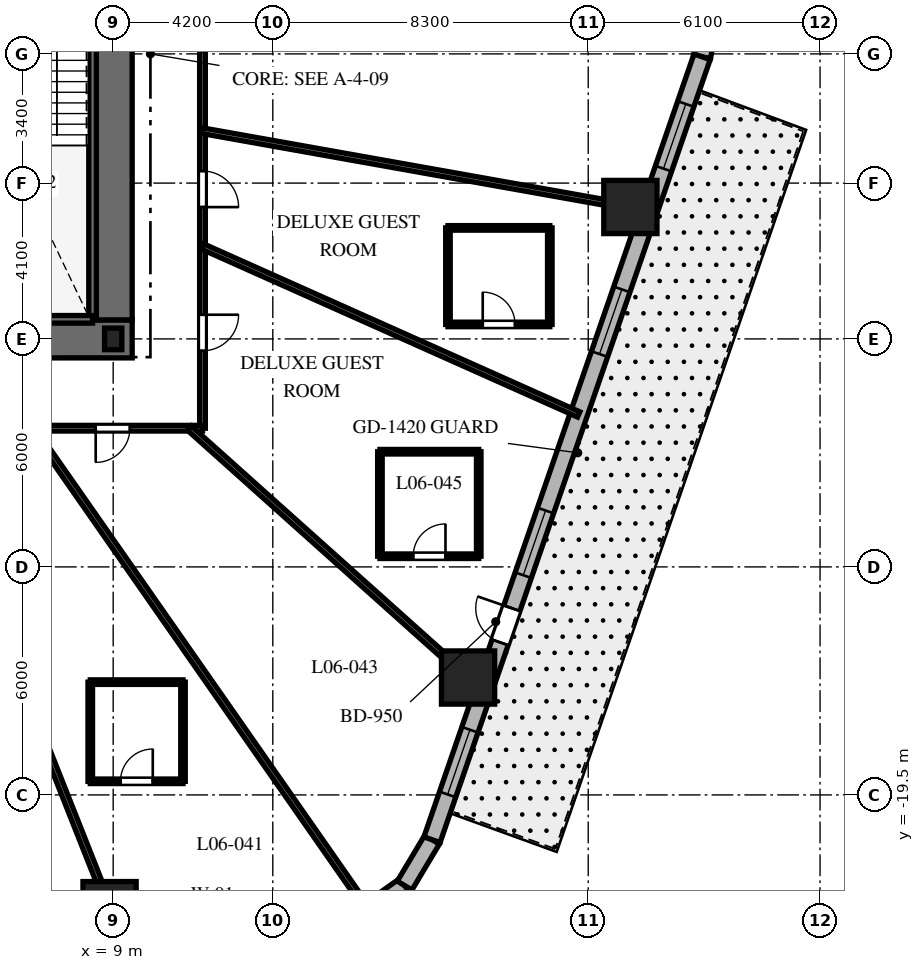
"""IFC4 building model, lengths in metres.
Left out: names, types, materials, properties, quantities, classifications, styles, units other than length and angle.
Written with IfcOpenShell. Run it as: python <this file> out.ifc"""

import sys

from ifc_helpers import new_model, si_unit, direction, frame, frame_2d, origin, origin_2d, place, context, subcontext, project, spatial, rectangle, i_section, extrude, element, fill, save


model = new_model("IFC4")
c1 = context("Model", 3, precision=1e-05, world=origin(), true_north=direction((0.0, 1.0)))
c2 = subcontext(c1, "Body", "Model", "MODEL_VIEW")
j1 = project(units=[si_unit("LENGTHUNIT", "METRE"), si_unit("PLANEANGLEUNIT", "RADIAN")], contexts=[c1])
p1 = place(None, origin())
s1 = spatial("IfcSite", under=j1, at=p1, CompositionType="ELEMENT")
p2 = place(p1, origin())
s2 = spatial("IfcBuilding", under=s1, at=p2, CompositionType="ELEMENT")
p3 = place(p2, frame((0.0, 0.0, 34.2)))
s3 = spatial("IfcBuildingStorey", under=s2, at=p3, CompositionType="ELEMENT", Elevation=34.2)
p4 = place(p3, frame((-9.5, -7.5, 0.0), z_axis=(0.0, 0.0, 1.0), x_axis=(1.0, 0.0, 0.0)))
e1 = element("IfcWall", 1, at=p4, inside=s3, PredefinedType="SHEAR", context=c2, shape_type="SweptSolid", body=[
    extrude(rectangle(XDim=19.0, YDim=1.0, at=frame_2d((9.5, 0.0))), origin(), (0.0, 0.0, 1.0), 3.7),
])
p5 = place(p4, frame((9.55, 0.0, 0.0)))
e2 = element("IfcOpeningElement", 2, at=p5, cuts=e1, PredefinedType="OPENING", context=c2, shape_type="SweptSolid", body=[
    extrude(rectangle(XDim=1.0, YDim=2.15, at=frame_2d((0.5, 1.075))), frame((0.0, 0.51, 0.0), z_axis=(0.0, -1.0, 0.0), x_axis=(1.0, 0.0, 0.0)), (0.0, 0.0, 1.0), 1.02),
])
p6 = place(p3, frame((9.0, -7.0, 0.0), z_axis=(0.0, 0.0, 1.0), x_axis=(0.0, 1.0, 0.0)))
e3 = element("IfcWall", 3, at=p6, inside=s3, PredefinedType="SHEAR", context=c2, shape_type="SweptSolid", body=[
    extrude(rectangle(XDim=14.0, YDim=1.0, at=frame_2d((7.0, 0.0))), origin(), (0.0, 0.0, 1.0), 3.7),
])
p7 = place(p6, frame((10.125, 0.0, 0.0)))
e4 = element("IfcOpeningElement", 4, at=p7, cuts=e3, PredefinedType="OPENING", context=c2, shape_type="SweptSolid", body=[
    extrude(rectangle(XDim=1.05, YDim=2.15, at=frame_2d((0.525, 1.075))), frame((0.0, 0.51, 0.0), z_axis=(0.0, -1.0, 0.0), x_axis=(1.0, 0.0, 0.0)), (0.0, 0.0, 1.0), 1.02),
])
p8 = place(p3, frame((8.458, -6.985, 0.0), z_axis=(0.0, 0.0, 1.0), x_axis=(0.0, 1.0, 0.0)))
e5 = element("IfcWall", 5, at=p8, inside=s3, PredefinedType="SHEAR", context=c2, shape_type="SweptSolid", body=[
    extrude(rectangle(XDim=9.143, YDim=0.2, at=frame_2d((4.572, 0.0))), origin(), (0.0, 0.0, 1.0), 3.7),
])
p9 = place(p3, frame((4.772, -6.985, 0.0), z_axis=(0.0, 0.0, 1.0), x_axis=(1.0, 0.0, 0.0)))
e6 = element("IfcWall", 6, at=p9, inside=s3, PredefinedType="SHEAR", context=c2, shape_type="SweptSolid", body=[
    extrude(rectangle(XDim=3.686, YDim=0.2, at=frame_2d((1.843, 0.0))), origin(), (0.0, 0.0, 1.0), 3.7),
])
p10 = place(p3, frame((9.0, -7.5, 0.0), z_axis=(0.0, 0.0, 1.0), x_axis=(1.0, 0.0, 0.0)))
e7 = element("IfcColumn", 7, at=p10, inside=s3, PredefinedType="COLUMN", context=c2, shape_type="SweptSolid", body=[
    extrude(i_section(OverallWidth=0.454, OverallDepth=0.569, WebThickness=0.078, FlangeThickness=0.125, at=origin_2d()), origin(), (0.0, 0.0, 1.0), 3.7),
])
for number, where, z_axis, x_axis in (
    (8, (8.905, -22.48, 0.0), (0.0, 0.0, 1.0), (1.0, 0.0, 0.0)),
    (9, (18.338, -16.411, 0.0), (0.0, 0.0, 1.0), (1.0, 0.0, 0.0)),
    (10, (22.609, -4.029, 0.0), (0.0, 0.0, 1.0), (1.0, 0.0, 0.0)),
):
    element("IfcColumn", number, at=place(p3, frame(where, z_axis=z_axis, x_axis=x_axis)), inside=s3, PredefinedType="COLUMN", context=c2, shape_type="SweptSolid", body=[
        extrude(rectangle(XDim=1.4, YDim=1.4, at=origin_2d()), origin(), (0.0, 0.0, 1.0), 3.7),
    ])
p11 = place(p3, frame((15.544, -22.687, 0.0), z_axis=(0.0, 0.0, 1.0), x_axis=(0.814210854316, 0.580569276412, 0.0)))
e11 = element("IfcWall", 11, at=p11, inside=s3, PredefinedType="SOLIDWALL", context=c2, shape_type="SweptSolid", body=[
    extrude(rectangle(XDim=1.381, YDim=0.45, at=frame_2d((0.691, 0.0))), origin(), (0.0, 0.0, 1.0), 3.4),
])
p12 = place(p3, frame((16.669, -21.885, 0.0), z_axis=(0.0, 0.0, 1.0), x_axis=(0.512936712947, 0.858426425799, 0.0)))
e12 = element("IfcWall", 12, at=p12, inside=s3, PredefinedType="SOLIDWALL", context=c2, shape_type="SweptSolid", body=[
    extrude(rectangle(XDim=1.406, YDim=0.45, at=frame_2d((0.703, 0.0))), origin(), (0.0, 0.0, 1.0), 3.4),
])
p13 = place(p3, frame((24.496, -0.077, 0.0), z_axis=(0.0, 0.0, 1.0), x_axis=(0.199570594521, 0.979883451132, 0.0)))
e13 = element("IfcWall", 13, at=p13, inside=s3, PredefinedType="SOLIDWALL", context=c2, shape_type="SweptSolid", body=[
    extrude(rectangle(XDim=0.897, YDim=0.45, at=frame_2d((0.448, 0.0))), origin(), (0.0, 0.0, 1.0), 3.4),
])
p14 = place(p3, frame((17.39, -20.678, 0.0), z_axis=(0.0, 0.0, 1.0), x_axis=(0.326068018294, 0.945346310854, 0.0)))
e14 = element("IfcWall", 14, at=p14, inside=s3, PredefinedType="SOLIDWALL", context=c2, shape_type="SweptSolid", body=[
    extrude(rectangle(XDim=21.793, YDim=0.45, at=frame_2d((10.896, 0.0))), origin(), (0.0, 0.0, 1.0), 3.4),
])
p15 = place(p14, frame((5.493, 0.0, 0.0)))
e15 = element("IfcOpeningElement", 15, at=p15, cuts=e14, PredefinedType="OPENING", context=c2, shape_type="SweptSolid", body=[
    extrude(rectangle(XDim=0.95, YDim=2.15, at=frame_2d((0.475, 1.075))), frame((0.0, 0.235, 0.0), z_axis=(0.0, -1.0, 0.0), x_axis=(1.0, 0.0, 0.0)), (0.0, 0.0, 1.0), 0.47),
])
p16 = place(p14, frame((1.26, 0.0, 0.8)))
e16 = element("IfcOpeningElement", 16, at=p16, cuts=e14, PredefinedType="OPENING", context=c2, shape_type="SweptSolid", body=[
    extrude(rectangle(XDim=1.8, YDim=1.8, at=frame_2d((0.9, 0.9))), frame((0.0, 0.235, 0.0), z_axis=(0.0, -1.0, 0.0), x_axis=(1.0, 0.0, 0.0)), (0.0, 0.0, 1.0), 0.47),
])
p17 = place(p14, frame((7.363, 0.0, 0.8)))
e17 = element("IfcOpeningElement", 17, at=p17, cuts=e14, PredefinedType="OPENING", context=c2, shape_type="SweptSolid", body=[
    extrude(rectangle(XDim=1.8, YDim=1.8, at=frame_2d((0.9, 0.9))), frame((0.0, 0.235, 0.0), z_axis=(0.0, -1.0, 0.0), x_axis=(1.0, 0.0, 0.0)), (0.0, 0.0, 1.0), 0.47),
])
p18 = place(p14, frame((13.518, 0.0, 0.8)))
e18 = element("IfcOpeningElement", 18, at=p18, cuts=e14, PredefinedType="OPENING", context=c2, shape_type="SweptSolid", body=[
    extrude(rectangle(XDim=1.8, YDim=1.8, at=frame_2d((0.9, 0.9))), frame((0.0, 0.235, 0.0), z_axis=(0.0, -1.0, 0.0), x_axis=(1.0, 0.0, 0.0)), (0.0, 0.0, 1.0), 0.47),
])
p19 = place(p14, frame((18.68, 0.0, 0.8)))
e19 = element("IfcOpeningElement", 19, at=p19, cuts=e14, PredefinedType="OPENING", context=c2, shape_type="SweptSolid", body=[
    extrude(rectangle(XDim=1.8, YDim=1.8, at=frame_2d((0.9, 0.9))), frame((0.0, 0.235, 0.0), z_axis=(0.0, -1.0, 0.0), x_axis=(1.0, 0.0, 0.0)), (0.0, 0.0, 1.0), 0.47),
])
p20 = place(p3, frame((11.35, 9.85, 0.0), z_axis=(0.0, 0.0, 1.0), x_axis=(0.0, -1.0, 0.0)))
e20 = element("IfcWall", 20, at=p20, inside=s3, PredefinedType="PARTITIONING", context=c2, shape_type="SweptSolid", body=[
    extrude(rectangle(XDim=19.7, YDim=0.15, at=frame_2d((9.85, 0.0))), origin(), (0.0, 0.0, 1.0), 2.84),
])
p21 = place(p20, frame((4.461, 0.0, 0.0)))
e21 = element("IfcOpeningElement", 21, at=p21, cuts=e20, PredefinedType="OPENING", context=c2, shape_type="SweptSolid", body=[
    extrude(rectangle(XDim=0.95, YDim=2.03, at=frame_2d((0.475, 1.015))), frame((0.0, 0.085, 0.0), z_axis=(0.0, -1.0, 0.0), x_axis=(1.0, 0.0, 0.0)), (0.0, 0.0, 1.0), 0.17),
])
p22 = place(p20, frame((1.221, 0.0, 0.0)))
e22 = element("IfcOpeningElement", 22, at=p22, cuts=e20, PredefinedType="OPENING", context=c2, shape_type="SweptSolid", body=[
    extrude(rectangle(XDim=0.95, YDim=2.03, at=frame_2d((0.475, 1.015))), frame((0.0, 0.085, 0.0), z_axis=(0.0, -1.0, 0.0), x_axis=(1.0, 0.0, 0.0)), (0.0, 0.0, 1.0), 0.17),
])
p23 = place(p20, frame((16.714, 0.0, 0.0)))
e23 = element("IfcOpeningElement", 23, at=p23, cuts=e20, PredefinedType="OPENING", context=c2, shape_type="SweptSolid", body=[
    extrude(rectangle(XDim=0.95, YDim=2.03, at=frame_2d((0.475, 1.015))), frame((0.0, 0.085, 0.0), z_axis=(0.0, -1.0, 0.0), x_axis=(1.0, 0.0, 0.0)), (0.0, 0.0, 1.0), 0.17),
])
p24 = place(p20, frame((12.932, 0.0, 0.0)))
e24 = element("IfcOpeningElement", 24, at=p24, cuts=e20, PredefinedType="OPENING", context=c2, shape_type="SweptSolid", body=[
    extrude(rectangle(XDim=0.95, YDim=2.03, at=frame_2d((0.475, 1.015))), frame((0.0, 0.085, 0.0), z_axis=(0.0, -1.0, 0.0), x_axis=(1.0, 0.0, 0.0)), (0.0, 0.0, 1.0), 0.17),
])
p25 = place(p20, frame((8.838, 0.0, 0.0)))
e25 = element("IfcOpeningElement", 25, at=p25, cuts=e20, PredefinedType="OPENING", context=c2, shape_type="SweptSolid", body=[
    extrude(rectangle(XDim=0.95, YDim=2.03, at=frame_2d((0.475, 1.015))), frame((0.0, 0.085, 0.0), z_axis=(0.0, -1.0, 0.0), x_axis=(1.0, 0.0, 0.0)), (0.0, 0.0, 1.0), 0.17),
])
p26 = place(p3, frame((11.35, -9.85, 0.0), z_axis=(0.0, 0.0, 1.0), x_axis=(-1.0, 0.0, 0.0)))
e26 = element("IfcWall", 26, at=p26, inside=s3, PredefinedType="PARTITIONING", context=c2, shape_type="SweptSolid", body=[
    extrude(rectangle(XDim=22.7, YDim=0.15, at=frame_2d((11.35, 0.0))), origin(), (0.0, 0.0, 1.0), 2.84),
])
p27 = place(p26, frame((18.436, 0.0, 0.0)))
e27 = element("IfcOpeningElement", 27, at=p27, cuts=e26, PredefinedType="OPENING", context=c2, shape_type="SweptSolid", body=[
    extrude(rectangle(XDim=0.95, YDim=2.03, at=frame_2d((0.475, 1.015))), frame((0.0, 0.085, 0.0), z_axis=(0.0, -1.0, 0.0), x_axis=(1.0, 0.0, 0.0)), (0.0, 0.0, 1.0), 0.17),
])
p28 = place(p26, frame((15.176, 0.0, 0.0)))
e28 = element("IfcOpeningElement", 28, at=p28, cuts=e26, PredefinedType="OPENING", context=c2, shape_type="SweptSolid", body=[
    extrude(rectangle(XDim=0.9, YDim=2.03, at=frame_2d((0.45, 1.015))), frame((0.0, 0.085, 0.0), z_axis=(0.0, -1.0, 0.0), x_axis=(1.0, 0.0, 0.0)), (0.0, 0.0, 1.0), 0.17),
])
p29 = place(p26, frame((12.415, 0.0, 0.0)))
e29 = element("IfcOpeningElement", 29, at=p29, cuts=e26, PredefinedType="OPENING", context=c2, shape_type="SweptSolid", body=[
    extrude(rectangle(XDim=0.95, YDim=2.03, at=frame_2d((0.475, 1.015))), frame((0.0, 0.085, 0.0), z_axis=(0.0, -1.0, 0.0), x_axis=(1.0, 0.0, 0.0)), (0.0, 0.0, 1.0), 0.17),
])
p30 = place(p26, frame((8.925, 0.0, 0.0)))
e30 = element("IfcOpeningElement", 30, at=p30, cuts=e26, PredefinedType="OPENING", context=c2, shape_type="SweptSolid", body=[
    extrude(rectangle(XDim=0.95, YDim=2.03, at=frame_2d((0.475, 1.015))), frame((0.0, 0.085, 0.0), z_axis=(0.0, -1.0, 0.0), x_axis=(1.0, 0.0, 0.0)), (0.0, 0.0, 1.0), 0.17),
])
p31 = place(p26, frame((5.463, 0.0, 0.0)))
e31 = element("IfcOpeningElement", 31, at=p31, cuts=e26, PredefinedType="OPENING", context=c2, shape_type="SweptSolid", body=[
    extrude(rectangle(XDim=0.95, YDim=2.03, at=frame_2d((0.475, 1.015))), frame((0.0, 0.085, 0.0), z_axis=(0.0, -1.0, 0.0), x_axis=(1.0, 0.0, 0.0)), (0.0, 0.0, 1.0), 0.17),
])
p32 = place(p26, frame((1.91, 0.0, 0.0)))
e32 = element("IfcOpeningElement", 32, at=p32, cuts=e26, PredefinedType="OPENING", context=c2, shape_type="SweptSolid", body=[
    extrude(rectangle(XDim=0.9, YDim=2.03, at=frame_2d((0.45, 1.015))), frame((0.0, 0.085, 0.0), z_axis=(0.0, -1.0, 0.0), x_axis=(1.0, 0.0, 0.0)), (0.0, 0.0, 1.0), 0.17),
])
p33 = place(p3, frame((3.902, -9.85, 0.0), z_axis=(0.0, 0.0, 1.0), x_axis=(0.36828765711, -0.929711891728, 0.0)))
e33 = element("IfcWall", 33, at=p33, inside=s3, PredefinedType="PARTITIONING", context=c2, shape_type="SweptSolid", body=[
    extrude(rectangle(XDim=14.117, YDim=0.15, at=frame_2d((7.059, 0.0))), origin(), (0.0, 0.0, 1.0), 2.54),
])
p34 = place(p3, frame((6.869, -9.85, 0.0), z_axis=(0.0, 0.0, 1.0), x_axis=(0.572039834497, -0.820225839479, 0.0)))
e34 = element("IfcWall", 34, at=p34, inside=s3, PredefinedType="PARTITIONING", context=c2, shape_type="SweptSolid", body=[
    extrude(rectangle(XDim=15.329, YDim=0.15, at=frame_2d((7.665, 0.0))), origin(), (0.0, 0.0, 1.0), 2.54),
])
p35 = place(p3, frame((11.007, -9.85, 0.0), z_axis=(0.0, 0.0, 1.0), x_axis=(0.745177305978, -0.666866390407, 0.0)))
e35 = element("IfcWall", 35, at=p35, inside=s3, PredefinedType="PARTITIONING", context=c2, shape_type="SweptSolid", body=[
    extrude(rectangle(XDim=10.375, YDim=0.15, at=frame_2d((5.188, 0.0))), origin(), (0.0, 0.0, 1.0), 2.54),
])
p36 = place(p3, frame((11.35, -5.068, 0.0), z_axis=(0.0, 0.0, 1.0), x_axis=(0.913107192911, -0.407719577963, 0.0)))
e36 = element("IfcWall", 36, at=p36, inside=s3, PredefinedType="PARTITIONING", context=c2, shape_type="SweptSolid", body=[
    extrude(rectangle(XDim=10.841, YDim=0.15, at=frame_2d((5.421, 0.0))), origin(), (0.0, 0.0, 1.0), 2.54),
])
p37 = place(p3, frame((11.35, -2.023, 0.0), z_axis=(0.0, 0.0, 1.0), x_axis=(0.984493741877, -0.17541970301, 0.0)))
e37 = element("IfcWall", 37, at=p37, inside=s3, PredefinedType="PARTITIONING", context=c2, shape_type="SweptSolid", body=[
    extrude(rectangle(XDim=11.937, YDim=0.15, at=frame_2d((5.969, 0.0))), origin(), (0.0, 0.0, 1.0), 2.54),
])
p38 = place(p3, frame((8.397, -19.142, 0.0), z_axis=(0.0, 0.0, 1.0), x_axis=(1.0, 0.0, 0.0)))
e38 = element("IfcWall", 38, at=p38, inside=s3, PredefinedType="PARTITIONING", context=c2, shape_type="SweptSolid", body=[
    extrude(rectangle(XDim=2.44, YDim=0.12, at=frame_2d((1.22, 0.0))), origin(), (0.0, 0.0, 1.0), 2.84),
])
p39 = place(p38, frame((0.795, 0.0, 0.0)))
e39 = element("IfcOpeningElement", 39, at=p39, cuts=e38, PredefinedType="OPENING", context=c2, shape_type="SweptSolid", body=[
    extrude(rectangle(XDim=0.85, YDim=2.03, at=frame_2d((0.425, 1.015))), frame((0.0, 0.07, 0.0), z_axis=(0.0, -1.0, 0.0), x_axis=(1.0, 0.0, 0.0)), (0.0, 0.0, 1.0), 0.14),
])
p40 = place(p3, frame((10.837, -19.142, 0.0), z_axis=(0.0, 0.0, 1.0), x_axis=(0.0, 1.0, 0.0)))
e40 = element("IfcWall", 40, at=p40, inside=s3, PredefinedType="PARTITIONING", context=c2, shape_type="SweptSolid", body=[
    extrude(rectangle(XDim=2.61, YDim=0.12, at=frame_2d((1.305, 0.0))), origin(), (0.0, 0.0, 1.0), 2.927),
])
p41 = place(p3, frame((10.837, -16.532, 0.0), z_axis=(0.0, 0.0, 1.0), x_axis=(-1.0, 0.0, 0.0)))
e41 = element("IfcWall", 41, at=p41, inside=s3, PredefinedType="PARTITIONING", context=c2, shape_type="SweptSolid", body=[
    extrude(rectangle(XDim=2.44, YDim=0.12, at=frame_2d((1.22, 0.0))), origin(), (0.0, 0.0, 1.0), 2.84),
])
p42 = place(p3, frame((8.397, -16.532, 0.0), z_axis=(0.0, 0.0, 1.0), x_axis=(0.0, -1.0, 0.0)))
e42 = element("IfcWall", 42, at=p42, inside=s3, PredefinedType="PARTITIONING", context=c2, shape_type="SweptSolid", body=[
    extrude(rectangle(XDim=2.61, YDim=0.12, at=frame_2d((1.305, 0.0))), origin(), (0.0, 0.0, 1.0), 2.841),
])
p43 = place(p3, frame((16.019, -13.219, 0.0), z_axis=(0.0, 0.0, 1.0), x_axis=(1.0, 0.0, 0.0)))
e43 = element("IfcWall", 43, at=p43, inside=s3, PredefinedType="PARTITIONING", context=c2, shape_type="SweptSolid", body=[
    extrude(rectangle(XDim=2.6, YDim=0.12, at=frame_2d((1.3, 0.0))), origin(), (0.0, 0.0, 1.0), 3.4),
])
p44 = place(p43, frame((0.875, 0.0, 0.0)))
e44 = element("IfcOpeningElement", 44, at=p44, cuts=e43, PredefinedType="OPENING", context=c2, shape_type="SweptSolid", body=[
    extrude(rectangle(XDim=0.85, YDim=2.03, at=frame_2d((0.425, 1.015))), frame((0.0, 0.07, 0.0), z_axis=(0.0, -1.0, 0.0), x_axis=(1.0, 0.0, 0.0)), (0.0, 0.0, 1.0), 0.14),
])
p45 = place(p3, frame((18.619, -13.219, 0.0), z_axis=(0.0, 0.0, 1.0), x_axis=(0.0, 1.0, 0.0)))
e45 = element("IfcWall", 45, at=p45, inside=s3, PredefinedType="PARTITIONING", context=c2, shape_type="SweptSolid", body=[
    extrude(rectangle(XDim=2.75, YDim=0.12, at=frame_2d((1.375, 0.0))), origin(), (0.0, 0.0, 1.0), 3.4),
])
p46 = place(p3, frame((18.619, -10.469, 0.0), z_axis=(0.0, 0.0, 1.0), x_axis=(-1.0, 0.0, 0.0)))
e46 = element("IfcWall", 46, at=p46, inside=s3, PredefinedType="PARTITIONING", context=c2, shape_type="SweptSolid", body=[
    extrude(rectangle(XDim=2.6, YDim=0.12, at=frame_2d((1.3, 0.0))), origin(), (0.0, 0.0, 1.0), 2.972),
])
p47 = place(p3, frame((16.019, -10.469, 0.0), z_axis=(0.0, 0.0, 1.0), x_axis=(0.0, -1.0, 0.0)))
e47 = element("IfcWall", 47, at=p47, inside=s3, PredefinedType="PARTITIONING", context=c2, shape_type="SweptSolid", body=[
    extrude(rectangle(XDim=2.75, YDim=0.12, at=frame_2d((1.375, 0.0))), origin(), (0.0, 0.0, 1.0), 2.972),
])
p48 = place(p3, frame((17.809, -7.119, 0.0), z_axis=(0.0, 0.0, 1.0), x_axis=(1.0, 0.0, 0.0)))
e48 = element("IfcWall", 48, at=p48, inside=s3, PredefinedType="PARTITIONING", context=c2, shape_type="SweptSolid", body=[
    extrude(rectangle(XDim=2.68, YDim=0.12, at=frame_2d((1.34, 0.0))), origin(), (0.0, 0.0, 1.0), 3.4),
])
p49 = place(p48, frame((0.915, 0.0, 0.0)))
e49 = element("IfcOpeningElement", 49, at=p49, cuts=e48, PredefinedType="OPENING", context=c2, shape_type="SweptSolid", body=[
    extrude(rectangle(XDim=0.85, YDim=2.03, at=frame_2d((0.425, 1.015))), frame((0.0, 0.07, 0.0), z_axis=(0.0, -1.0, 0.0), x_axis=(1.0, 0.0, 0.0)), (0.0, 0.0, 1.0), 0.14),
])
p50 = place(p3, frame((20.489, -7.119, 0.0), z_axis=(0.0, 0.0, 1.0), x_axis=(0.0, 1.0, 0.0)))
e50 = element("IfcWall", 50, at=p50, inside=s3, PredefinedType="PARTITIONING", context=c2, shape_type="SweptSolid", body=[
    extrude(rectangle(XDim=2.54, YDim=0.12, at=frame_2d((1.27, 0.0))), origin(), (0.0, 0.0, 1.0), 2.84),
])
p51 = place(p3, frame((20.489, -4.579, 0.0), z_axis=(0.0, 0.0, 1.0), x_axis=(-1.0, 0.0, 0.0)))
e51 = element("IfcWall", 51, at=p51, inside=s3, PredefinedType="PARTITIONING", context=c2, shape_type="SweptSolid", body=[
    extrude(rectangle(XDim=2.68, YDim=0.12, at=frame_2d((1.34, 0.0))), origin(), (0.0, 0.0, 1.0), 2.84),
])
p52 = place(p3, frame((17.809, -4.579, 0.0), z_axis=(0.0, 0.0, 1.0), x_axis=(0.0, -1.0, 0.0)))
e52 = element("IfcWall", 52, at=p52, inside=s3, PredefinedType="PARTITIONING", context=c2, shape_type="SweptSolid", body=[
    extrude(rectangle(XDim=2.54, YDim=0.12, at=frame_2d((1.27, 0.0))), origin(), (0.0, 0.0, 1.0), 2.84),
])
p53 = place(p15, origin())
e53 = element("IfcDoor", 53, at=p53, inside=s3, OperationType="SINGLE_SWING_RIGHT", PredefinedType="DOOR", context=c2, shape_type="SweptSolid", body=[
    extrude(rectangle(XDim=0.95, YDim=2.15, at=frame_2d((0.475, 1.075))), frame((0.0, 0.025, 0.0), z_axis=(0.0, -1.0, 0.0), x_axis=(1.0, 0.0, 0.0)), (0.0, 0.0, 1.0), 0.05),
])
fill(e15, e53)
p54 = place(p16, origin())
e54 = element("IfcWindow", 54, at=p54, inside=s3, PartitioningType="SINGLE_PANEL", PredefinedType="WINDOW", context=c2, shape_type="SweptSolid", body=[
    extrude(rectangle(XDim=1.8, YDim=1.8, at=frame_2d((0.9, 0.9))), frame((0.0, 0.03, 0.0), z_axis=(0.0, -1.0, 0.0), x_axis=(1.0, 0.0, 0.0)), (0.0, 0.0, 1.0), 0.06),
])
fill(e16, e54)
p55 = place(p17, origin())
e55 = element("IfcWindow", 55, at=p55, inside=s3, PartitioningType="SINGLE_PANEL", PredefinedType="WINDOW", context=c2, shape_type="SweptSolid", body=[
    extrude(rectangle(XDim=1.8, YDim=1.8, at=frame_2d((0.9, 0.9))), frame((0.0, 0.03, 0.0), z_axis=(0.0, -1.0, 0.0), x_axis=(1.0, 0.0, 0.0)), (0.0, 0.0, 1.0), 0.06),
])
fill(e17, e55)
p56 = place(p18, origin())
e56 = element("IfcWindow", 56, at=p56, inside=s3, PartitioningType="SINGLE_PANEL", PredefinedType="WINDOW", context=c2, shape_type="SweptSolid", body=[
    extrude(rectangle(XDim=1.8, YDim=1.8, at=frame_2d((0.9, 0.9))), frame((0.0, 0.03, 0.0), z_axis=(0.0, -1.0, 0.0), x_axis=(1.0, 0.0, 0.0)), (0.0, 0.0, 1.0), 0.06),
])
fill(e18, e56)
p57 = place(p19, origin())
e57 = element("IfcWindow", 57, at=p57, inside=s3, PartitioningType="SINGLE_PANEL", PredefinedType="WINDOW", context=c2, shape_type="SweptSolid", body=[
    extrude(rectangle(XDim=1.8, YDim=1.8, at=frame_2d((0.9, 0.9))), frame((0.0, 0.03, 0.0), z_axis=(0.0, -1.0, 0.0), x_axis=(1.0, 0.0, 0.0)), (0.0, 0.0, 1.0), 0.06),
])
fill(e19, e57)
p58 = place(p39, origin())
e58 = element("IfcDoor", 58, at=p58, inside=s3, OperationType="SINGLE_SWING_RIGHT", PredefinedType="DOOR", context=c2, shape_type="SweptSolid", body=[
    extrude(rectangle(XDim=0.85, YDim=2.03, at=frame_2d((0.425, 1.015))), frame((0.0, 0.025, 0.0), z_axis=(0.0, -1.0, 0.0), x_axis=(1.0, 0.0, 0.0)), (0.0, 0.0, 1.0), 0.05),
])
fill(e39, e58)
p59 = place(p32, origin())
e59 = element("IfcDoor", 59, at=p59, inside=s3, OperationType="SINGLE_SWING_RIGHT", PredefinedType="DOOR", context=c2, shape_type="SweptSolid", body=[
    extrude(rectangle(XDim=0.9, YDim=2.03, at=frame_2d((0.45, 1.015))), frame((0.0, 0.025, 0.0), z_axis=(0.0, -1.0, 0.0), x_axis=(1.0, 0.0, 0.0)), (0.0, 0.0, 1.0), 0.05),
])
fill(e32, e59)
p60 = place(p23, origin())
e60 = element("IfcDoor", 60, at=p60, inside=s3, OperationType="SINGLE_SWING_LEFT", PredefinedType="DOOR", context=c2, shape_type="SweptSolid", body=[
    extrude(rectangle(XDim=0.95, YDim=2.03, at=frame_2d((0.475, 1.015))), frame((0.0, 0.025, 0.0), z_axis=(0.0, -1.0, 0.0), x_axis=(1.0, 0.0, 0.0)), (0.0, 0.0, 1.0), 0.05),
])
fill(e23, e60)
p61 = place(p44, origin())
e61 = element("IfcDoor", 61, at=p61, inside=s3, OperationType="SINGLE_SWING_RIGHT", PredefinedType="DOOR", context=c2, shape_type="SweptSolid", body=[
    extrude(rectangle(XDim=0.85, YDim=2.03, at=frame_2d((0.425, 1.015))), frame((0.0, 0.025, 0.0), z_axis=(0.0, -1.0, 0.0), x_axis=(1.0, 0.0, 0.0)), (0.0, 0.0, 1.0), 0.05),
])
fill(e44, e61)
p62 = place(p24, origin())
e62 = element("IfcDoor", 62, at=p62, inside=s3, OperationType="SINGLE_SWING_RIGHT", PredefinedType="DOOR", context=c2, shape_type="SweptSolid", body=[
    extrude(rectangle(XDim=0.95, YDim=2.03, at=frame_2d((0.475, 1.015))), frame((0.0, 0.025, 0.0), z_axis=(0.0, -1.0, 0.0), x_axis=(1.0, 0.0, 0.0)), (0.0, 0.0, 1.0), 0.05),
])
fill(e24, e62)
p63 = place(p49, origin())
e63 = element("IfcDoor", 63, at=p63, inside=s3, OperationType="SINGLE_SWING_LEFT", PredefinedType="DOOR", context=c2, shape_type="SweptSolid", body=[
    extrude(rectangle(XDim=0.85, YDim=2.03, at=frame_2d((0.425, 1.015))), frame((0.0, 0.025, 0.0), z_axis=(0.0, -1.0, 0.0), x_axis=(1.0, 0.0, 0.0)), (0.0, 0.0, 1.0), 0.05),
])
fill(e49, e63)
save(model, sys.argv[1])
